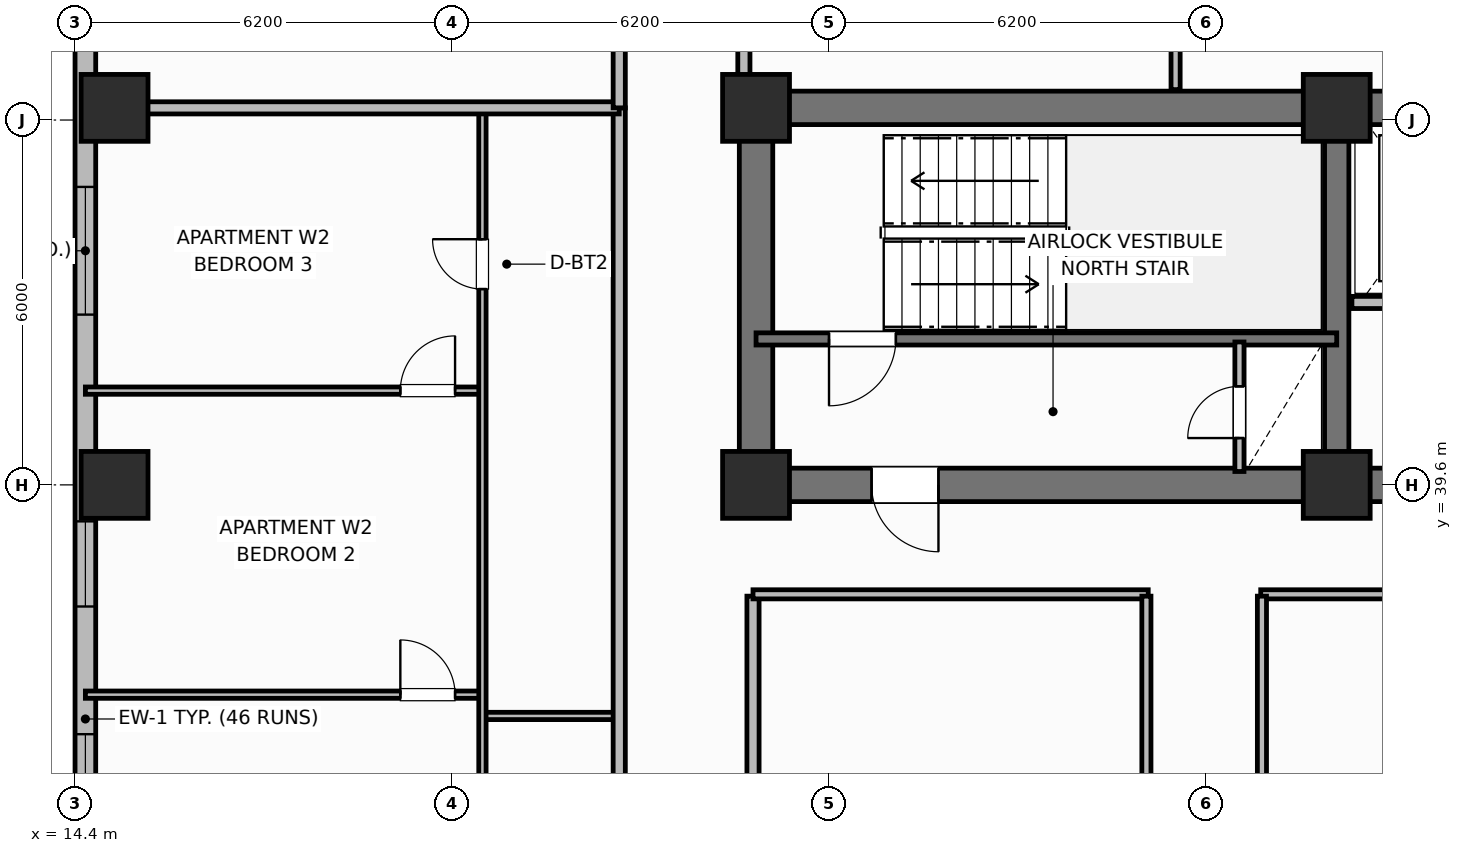
"""IFC4 building model, lengths in metres.
Left out: names, types, materials, properties, quantities, classifications, styles, units other than length and angle.
Written with IfcOpenShell. Run it as: python <this file> out.ifc"""

import sys

from ifc_helpers import new_model, si_unit, direction, frame, frame_2d, origin, origin_2d, place, context, subcontext, project, spatial, rectangle, extrude, element, fill, save


model = new_model("IFC4")
c1 = context("Model", 3, precision=1e-05, world=origin(), true_north=direction((0.0, 1.0)))
c2 = subcontext(c1, "Body", "Model", "MODEL_VIEW")
j1 = project(units=[si_unit("LENGTHUNIT", "METRE"), si_unit("PLANEANGLEUNIT", "RADIAN")], contexts=[c1])
p1 = place(None, origin())
s1 = spatial("IfcSite", under=j1, at=p1, CompositionType="ELEMENT")
p2 = place(p1, origin())
s2 = spatial("IfcBuilding", under=s1, at=p2, CompositionType="ELEMENT")
p3 = place(p2, frame((0.0, 0.0, 121.6)))
s3 = spatial("IfcBuildingStorey", under=s2, at=p3, CompositionType="ELEMENT", Elevation=121.6)
p4 = place(p3, frame((25.6, 45.8, 0.0), z_axis=(0.0, 0.0, 1.0), x_axis=(1.0, 0.0, 0.0)))
e1 = element("IfcWall", 1, at=p4, inside=s3, PredefinedType="SHEAR", context=c2, shape_type="SweptSolid", body=[
    extrude(rectangle(XDim=27.2, YDim=0.55, at=frame_2d((13.6, 0.0))), origin(), (0.0, 0.0, 1.0), 3.7),
])
p5 = place(p3, frame((25.6, 39.875, 0.0), z_axis=(0.0, 0.0, 1.0), x_axis=(0.0, 1.0, 0.0)))
e2 = element("IfcWall", 2, at=p5, inside=s3, PredefinedType="SHEAR", context=c2, shape_type="SweptSolid", body=[
    extrude(rectangle(XDim=5.65, YDim=0.55, at=frame_2d((2.825, 0.0))), origin(), (0.0, 0.0, 1.0), 3.7),
])
p6 = place(p3, frame((52.8, 39.6, 0.0), z_axis=(0.0, 0.0, 1.0), x_axis=(-1.0, 0.0, 0.0)))
e3 = element("IfcWall", 3, at=p6, inside=s3, PredefinedType="SHEAR", context=c2, shape_type="SweptSolid", body=[
    extrude(rectangle(XDim=27.2, YDim=0.55, at=frame_2d((13.6, 0.0))), origin(), (0.0, 0.0, 1.0), 3.7),
])
p7 = place(p6, frame((24.2, 0.0, 0.0)))
e4 = element("IfcOpeningElement", 4, at=p7, cuts=e3, PredefinedType="OPENING", context=c2, shape_type="SweptSolid", body=[
    extrude(rectangle(XDim=1.1, YDim=2.15, at=frame_2d((0.55, 1.075))), frame((0.0, 0.285, 0.0), z_axis=(0.0, -1.0, 0.0), x_axis=(1.0, 0.0, 0.0)), (0.0, 0.0, 1.0), 0.57),
])
p8 = place(p6, frame((15.1, 0.0, 0.0)))
e5 = element("IfcOpeningElement", 5, at=p8, cuts=e3, PredefinedType="OPENING", context=c2, shape_type="SweptSolid", body=[
    extrude(rectangle(XDim=1.2, YDim=2.15, at=frame_2d((0.6, 1.075))), frame((0.0, 0.285, 0.0), z_axis=(0.0, -1.0, 0.0), x_axis=(1.0, 0.0, 0.0)), (0.0, 0.0, 1.0), 0.57),
])
p9 = place(p6, frame((11.3, 0.0, 0.0)))
e6 = element("IfcOpeningElement", 6, at=p9, cuts=e3, PredefinedType="OPENING", context=c2, shape_type="SweptSolid", body=[
    extrude(rectangle(XDim=1.3, YDim=2.2, at=frame_2d((0.65, 1.1))), frame((0.0, 0.285, 0.0), z_axis=(0.0, -1.0, 0.0), x_axis=(1.0, 0.0, 0.0)), (0.0, 0.0, 1.0), 0.57),
])
p10 = place(p6, frame((7.25, 0.0, 0.0)))
e7 = element("IfcOpeningElement", 7, at=p10, cuts=e3, PredefinedType="OPENING", context=c2, shape_type="SweptSolid", body=[
    extrude(rectangle(XDim=0.85, YDim=2.1, at=frame_2d((0.425, 1.05))), frame((0.0, 0.285, 0.0), z_axis=(0.0, -1.0, 0.0), x_axis=(1.0, 0.0, 0.0)), (0.0, 0.0, 1.0), 0.57),
])
p11 = place(p6, frame((3.0, 0.0, 0.0)))
e8 = element("IfcOpeningElement", 8, at=p11, cuts=e3, PredefinedType="OPENING", context=c2, shape_type="SweptSolid", body=[
    extrude(rectangle(XDim=0.9, YDim=2.1, at=frame_2d((0.45, 1.05))), frame((0.0, 0.285, 0.0), z_axis=(0.0, -1.0, 0.0), x_axis=(1.0, 0.0, 0.0)), (0.0, 0.0, 1.0), 0.57),
])
p12 = place(p3, frame((35.15, 39.875, 0.0), z_axis=(0.0, 0.0, 1.0), x_axis=(0.0, 1.0, 0.0)))
e9 = element("IfcWall", 9, at=p12, inside=s3, PredefinedType="SHEAR", context=c2, shape_type="SweptSolid", body=[
    extrude(rectangle(XDim=5.65, YDim=0.4, at=frame_2d((2.825, 0.0))), origin(), (0.0, 0.0, 1.0), 3.7),
])
for number, where, z_axis, x_axis in (
    (10, (25.6, 39.6, 0.0), (0.0, 0.0, 1.0), (1.0, 0.0, 0.0)),
    (11, (25.6, 45.8, 0.0), (0.0, 0.0, 1.0), (1.0, 0.0, 0.0)),
    (12, (35.15, 39.6, 0.0), (0.0, 0.0, 1.0), (1.0, 0.0, 0.0)),
    (13, (35.15, 45.8, 0.0), (0.0, 0.0, 1.0), (1.0, 0.0, 0.0)),
    (14, (15.05, 39.6, 0.0), (0.0, 0.0, 1.0), (1.0, 0.0, 0.0)),
    (15, (15.05, 45.8, 0.0), (0.0, 0.0, 1.0), (1.0, 0.0, 0.0)),
):
    element("IfcColumn", number, at=place(p3, frame(where, z_axis=z_axis, x_axis=x_axis)), inside=s3, PredefinedType="COLUMN", context=c2, shape_type="SweptSolid", body=[
        extrude(rectangle(XDim=1.1, YDim=1.1, at=origin_2d()), origin(), (0.0, 0.0, 1.0), 3.7),
    ])
p13 = place(p3, frame((14.57, 47.4, 0.0), z_axis=(0.0, 0.0, 1.0), x_axis=(0.0, -1.0, 0.0)))
e16 = element("IfcWall", 16, at=p13, inside=s3, PredefinedType="SOLIDWALL", context=c2, shape_type="SweptSolid", body=[
    extrude(rectangle(XDim=14.8, YDim=0.34, at=frame_2d((7.4, 0.0))), origin(), (0.0, 0.0, 1.0), 2.7),
])
p14 = place(p13, frame((2.9, 0.0, 0.68)))
e17 = element("IfcOpeningElement", 17, at=p14, cuts=e16, PredefinedType="OPENING", context=c2, shape_type="SweptSolid", body=[
    extrude(rectangle(XDim=2.1, YDim=1.9, at=frame_2d((1.05, 0.95))), frame((0.0, 0.18, 0.0), z_axis=(0.0, -1.0, 0.0), x_axis=(1.0, 0.0, 0.0)), (0.0, 0.0, 1.0), 0.36),
])
p15 = place(p13, frame((8.4, 0.0, 0.69)))
e18 = element("IfcOpeningElement", 18, at=p15, cuts=e16, PredefinedType="OPENING", context=c2, shape_type="SweptSolid", body=[
    extrude(rectangle(XDim=1.4, YDim=1.85, at=frame_2d((0.7, 0.925))), frame((0.0, 0.18, 0.0), z_axis=(0.0, -1.0, 0.0), x_axis=(1.0, 0.0, 0.0)), (0.0, 0.0, 1.0), 0.36),
])
p16 = place(p13, frame((11.9, 0.0, 0.68)))
e19 = element("IfcOpeningElement", 19, at=p16, cuts=e16, PredefinedType="OPENING", context=c2, shape_type="SweptSolid", body=[
    extrude(rectangle(XDim=2.1, YDim=1.9, at=frame_2d((1.05, 0.95))), frame((0.0, 0.18, 0.0), z_axis=(0.0, -1.0, 0.0), x_axis=(1.0, 0.0, 0.0)), (0.0, 0.0, 1.0), 0.36),
])
p17 = place(p3, frame((35.15, 42.0, 0.0), z_axis=(0.0, 0.0, 1.0), x_axis=(-1.0, 0.0, 0.0)))
e20 = element("IfcWall", 20, at=p17, inside=s3, PredefinedType="SHEAR", context=c2, shape_type="SweptSolid", body=[
    extrude(rectangle(XDim=9.55, YDim=0.2, at=frame_2d((4.775, 0.0))), origin(), (0.0, 0.0, 1.0), 3.7),
])
p18 = place(p17, frame((7.25, 0.0, 0.0)))
e21 = element("IfcOpeningElement", 21, at=p18, cuts=e20, PredefinedType="OPENING", context=c2, shape_type="SweptSolid", body=[
    extrude(rectangle(XDim=1.1, YDim=2.15, at=frame_2d((0.55, 1.075))), frame((0.0, 0.11, 0.0), z_axis=(0.0, -1.0, 0.0), x_axis=(1.0, 0.0, 0.0)), (0.0, 0.0, 1.0), 0.22),
])
p19 = place(p3, frame((33.55, 39.82, 0.0), z_axis=(0.0, 0.0, 1.0), x_axis=(0.0, 1.0, 0.0)))
e22 = element("IfcWall", 22, at=p19, inside=s3, PredefinedType="PARTITIONING", context=c2, shape_type="SweptSolid", body=[
    extrude(rectangle(XDim=2.13, YDim=0.15, at=frame_2d((1.065, 0.0))), origin(), (0.0, 0.0, 1.0), 2.53),
])
p20 = place(p19, frame((0.55, 0.0, 0.0)))
e23 = element("IfcOpeningElement", 23, at=p20, cuts=e22, PredefinedType="OPENING", context=c2, shape_type="SweptSolid", body=[
    extrude(rectangle(XDim=0.85, YDim=2.05, at=frame_2d((0.425, 1.025))), frame((0.0, 0.085, 0.0), z_axis=(0.0, -1.0, 0.0), x_axis=(1.0, 0.0, 0.0)), (0.0, 0.0, 1.0), 0.17),
])
p21 = place(p3, frame((37.95, 42.6, 0.0), z_axis=(0.0, 0.0, 1.0), x_axis=(-1.0, 0.0, 0.0)))
e24 = element("IfcWall", 24, at=p21, inside=s3, PredefinedType="PARTITIONING", context=c2, shape_type="SweptSolid", body=[
    extrude(rectangle(XDim=2.55, YDim=0.2, at=frame_2d((1.275, 0.0))), origin(), (0.0, 0.0, 1.0), 2.3),
])
p22 = place(p21, frame((0.75, 0.0, 0.0)))
e25 = element("IfcOpeningElement", 25, at=p22, cuts=e24, PredefinedType="OPENING", context=c2, shape_type="SweptSolid", body=[
    extrude(rectangle(XDim=1.1, YDim=2.15, at=frame_2d((0.55, 1.075))), frame((0.0, 0.11, 0.0), z_axis=(0.0, -1.0, 0.0), x_axis=(1.0, 0.0, 0.0)), (0.0, 0.0, 1.0), 0.22),
])
p23 = place(p3, frame((25.55, 18.63, 0.0), z_axis=(0.0, 0.0, 1.0), x_axis=(0.0, 1.0, 0.0)))
e26 = element("IfcWall", 26, at=p23, inside=s3, PredefinedType="PARTITIONING", context=c2, shape_type="SweptSolid", body=[
    extrude(rectangle(XDim=19.14, YDim=0.2, at=frame_2d((9.57, 0.0))), origin(), (0.0, 0.0, 1.0), 2.53),
])
p24 = place(p3, frame((25.55, 37.8, 0.0), z_axis=(0.0, 0.0, 1.0), x_axis=(1.0, 0.0, 0.0)))
e27 = element("IfcWall", 27, at=p24, inside=s3, PredefinedType="PARTITIONING", context=c2, shape_type="SweptSolid", body=[
    extrude(rectangle(XDim=6.5, YDim=0.15, at=frame_2d((3.25, 0.0))), origin(), (0.0, 0.0, 1.0), 2.53),
])
p25 = place(p3, frame((33.9, 37.8, 0.0), z_axis=(0.0, 0.0, 1.0), x_axis=(1.0, 0.0, 0.0)))
e28 = element("IfcWall", 28, at=p25, inside=s3, PredefinedType="PARTITIONING", context=c2, shape_type="SweptSolid", body=[
    extrude(rectangle(XDim=10.6, YDim=0.15, at=frame_2d((5.3, 0.0))), origin(), (0.0, 0.0, 1.0), 2.53),
])
p26 = place(p3, frame((32.02, 18.63, 0.0), z_axis=(0.0, 0.0, 1.0), x_axis=(0.0, 1.0, 0.0)))
e29 = element("IfcWall", 29, at=p26, inside=s3, PredefinedType="PARTITIONING", context=c2, shape_type="SweptSolid", body=[
    extrude(rectangle(XDim=19.14, YDim=0.15, at=frame_2d((9.57, 0.0))), origin(), (0.0, 0.0, 1.0), 2.53),
])
p27 = place(p26, frame((5.0, 0.0, 0.0)))
e30 = element("IfcOpeningElement", 30, at=p27, cuts=e29, PredefinedType="OPENING", context=c2, shape_type="SweptSolid", body=[
    extrude(rectangle(XDim=0.9, YDim=2.1, at=frame_2d((0.45, 1.05))), frame((0.0, 0.085, 0.0), z_axis=(0.0, -1.0, 0.0), x_axis=(1.0, 0.0, 0.0)), (0.0, 0.0, 1.0), 0.17),
])
p28 = place(p3, frame((33.92, 18.63, 0.0), z_axis=(0.0, 0.0, 1.0), x_axis=(0.0, 1.0, 0.0)))
e31 = element("IfcWall", 31, at=p28, inside=s3, PredefinedType="PARTITIONING", context=c2, shape_type="SweptSolid", body=[
    extrude(rectangle(XDim=19.14, YDim=0.15, at=frame_2d((9.57, 0.0))), origin(), (0.0, 0.0, 1.0), 2.53),
])
p29 = place(p28, frame((6.5, 0.0, 0.0)))
e32 = element("IfcOpeningElement", 32, at=p29, cuts=e31, PredefinedType="OPENING", context=c2, shape_type="SweptSolid", body=[
    extrude(rectangle(XDim=1.0, YDim=2.15, at=frame_2d((0.5, 1.075))), frame((0.0, 0.085, 0.0), z_axis=(0.0, -1.0, 0.0), x_axis=(1.0, 0.0, 0.0)), (0.0, 0.0, 1.0), 0.17),
])
p30 = place(p3, frame((21.1, 35.8, 0.0), z_axis=(0.0, 0.0, 1.0), x_axis=(1.0, 0.0, 0.0)))
e33 = element("IfcWall", 33, at=p30, inside=s3, PredefinedType="PARTITIONING", context=c2, shape_type="SweptSolid", body=[
    extrude(rectangle(XDim=2.25, YDim=0.12, at=frame_2d((1.125, 0.0))), origin(), (0.0, 0.0, 1.0), 2.53),
])
p31 = place(p3, frame((14.57, 36.15, 0.0), z_axis=(0.0, 0.0, 1.0), x_axis=(1.0, 0.0, 0.0)))
e34 = element("IfcWall", 34, at=p31, inside=s3, PredefinedType="PARTITIONING", context=c2, shape_type="SweptSolid", body=[
    extrude(rectangle(XDim=6.53, YDim=0.12, at=frame_2d((3.265, 0.0))), origin(), (0.0, 0.0, 1.0), 2.53),
])
p32 = place(p31, frame((5.18, 0.0, 0.0)))
e35 = element("IfcOpeningElement", 35, at=p32, cuts=e34, PredefinedType="OPENING", context=c2, shape_type="SweptSolid", body=[
    extrude(rectangle(XDim=0.9, YDim=2.1, at=frame_2d((0.45, 1.05))), frame((0.0, 0.07, 0.0), z_axis=(0.0, -1.0, 0.0), x_axis=(1.0, 0.0, 0.0)), (0.0, 0.0, 1.0), 0.14),
])
p33 = place(p3, frame((14.57, 41.15, 0.0), z_axis=(0.0, 0.0, 1.0), x_axis=(1.0, 0.0, 0.0)))
e36 = element("IfcWall", 36, at=p33, inside=s3, PredefinedType="PARTITIONING", context=c2, shape_type="SweptSolid", body=[
    extrude(rectangle(XDim=6.53, YDim=0.12, at=frame_2d((3.265, 0.0))), origin(), (0.0, 0.0, 1.0), 2.53),
])
p34 = place(p33, frame((5.18, 0.0, 0.0)))
e37 = element("IfcOpeningElement", 37, at=p34, cuts=e36, PredefinedType="OPENING", context=c2, shape_type="SweptSolid", body=[
    extrude(rectangle(XDim=0.9, YDim=2.1, at=frame_2d((0.45, 1.05))), frame((0.0, 0.07, 0.0), z_axis=(0.0, -1.0, 0.0), x_axis=(1.0, 0.0, 0.0)), (0.0, 0.0, 1.0), 0.14),
])
p35 = place(p3, frame((21.1, 26.64, 0.0), z_axis=(0.0, 0.0, 1.0), x_axis=(0.0, 1.0, 0.0)))
e38 = element("IfcWall", 38, at=p35, inside=s3, PredefinedType="PARTITIONING", context=c2, shape_type="SweptSolid", body=[
    extrude(rectangle(XDim=19.12, YDim=0.12, at=frame_2d((9.56, 0.0))), origin(), (0.0, 0.0, 1.0), 2.53),
])
p36 = place(p35, frame((2.81, 0.0, 0.0)))
e39 = element("IfcOpeningElement", 39, at=p36, cuts=e38, PredefinedType="OPENING", context=c2, shape_type="SweptSolid", body=[
    extrude(rectangle(XDim=0.9, YDim=2.1, at=frame_2d((0.45, 1.05))), frame((0.0, 0.07, 0.0), z_axis=(0.0, -1.0, 0.0), x_axis=(1.0, 0.0, 0.0)), (0.0, 0.0, 1.0), 0.14),
])
p37 = place(p35, frame((16.18, 0.0, 0.0)))
e40 = element("IfcOpeningElement", 40, at=p37, cuts=e38, PredefinedType="OPENING", context=c2, shape_type="SweptSolid", body=[
    extrude(rectangle(XDim=0.82, YDim=2.08, at=frame_2d((0.41, 1.04))), frame((0.0, 0.07, 0.0), z_axis=(0.0, -1.0, 0.0), x_axis=(1.0, 0.0, 0.0)), (0.0, 0.0, 1.0), 0.14),
])
p38 = place(p3, frame((23.35, 10.6, 0.0), z_axis=(0.0, 0.0, 1.0), x_axis=(0.0, 1.0, 0.0)))
e41 = element("IfcWall", 41, at=p38, inside=s3, PredefinedType="PARTITIONING", context=c2, shape_type="SweptSolid", body=[
    extrude(rectangle(XDim=35.2, YDim=0.2, at=frame_2d((17.6, 0.0))), origin(), (0.0, 0.0, 1.0), 2.53),
])
p39 = place(p38, frame((2.65, 0.0, 0.0)))
e42 = element("IfcOpeningElement", 42, at=p39, cuts=e41, PredefinedType="OPENING", context=c2, shape_type="SweptSolid", body=[
    extrude(rectangle(XDim=1.0, YDim=2.15, at=frame_2d((0.5, 1.075))), frame((0.0, 0.11, 0.0), z_axis=(0.0, -1.0, 0.0), x_axis=(1.0, 0.0, 0.0)), (0.0, 0.0, 1.0), 0.22),
])
p40 = place(p38, frame((19.95, 0.0, 0.0)))
e43 = element("IfcOpeningElement", 43, at=p40, cuts=e41, PredefinedType="OPENING", context=c2, shape_type="SweptSolid", body=[
    extrude(rectangle(XDim=1.0, YDim=2.15, at=frame_2d((0.5, 1.075))), frame((0.0, 0.11, 0.0), z_axis=(0.0, -1.0, 0.0), x_axis=(1.0, 0.0, 0.0)), (0.0, 0.0, 1.0), 0.22),
])
p41 = place(p3, frame((14.99, 45.8, 0.0), z_axis=(0.0, 0.0, 1.0), x_axis=(1.0, 0.0, 0.0)))
e44 = element("IfcWall", 44, at=p41, inside=s3, PredefinedType="PARTITIONING", context=c2, shape_type="SweptSolid", body=[
    extrude(rectangle(XDim=8.36, YDim=0.2, at=frame_2d((4.18, 0.0))), origin(), (0.0, 0.0, 1.0), 2.53),
])
p42 = place(p3, frame((23.35, 45.8, 0.0), z_axis=(0.0, 0.0, 1.0), x_axis=(0.0, 1.0, 0.0)))
e45 = element("IfcWall", 45, at=p42, inside=s3, PredefinedType="PARTITIONING", context=c2, shape_type="SweptSolid", body=[
    extrude(rectangle(XDim=5.63, YDim=0.2, at=frame_2d((2.815, 0.0))), origin(), (0.0, 0.0, 1.0), 2.53),
])
p43 = place(p3, frame((32.5, 46.1, 0.0), z_axis=(0.0, 0.0, 1.0), x_axis=(0.0, 1.0, 0.0)))
e46 = element("IfcWall", 46, at=p43, inside=s3, PredefinedType="PARTITIONING", context=c2, shape_type="SweptSolid", body=[
    extrude(rectangle(XDim=5.33, YDim=0.15, at=frame_2d((2.665, 0.0))), origin(), (0.0, 0.0, 1.0), 2.53),
])
p44 = place(p43, frame((0.85, 0.0, 0.0)))
e47 = element("IfcOpeningElement", 47, at=p44, cuts=e46, PredefinedType="OPENING", context=c2, shape_type="SweptSolid", body=[
    extrude(rectangle(XDim=0.9, YDim=2.1, at=frame_2d((0.45, 1.05))), frame((0.0, 0.085, 0.0), z_axis=(0.0, -1.0, 0.0), x_axis=(1.0, 0.0, 0.0)), (0.0, 0.0, 1.0), 0.17),
])
p45 = place(p3, frame((25.4, 46.1, 0.0), z_axis=(0.0, 0.0, 1.0), x_axis=(0.0, 1.0, 0.0)))
e48 = element("IfcWall", 48, at=p45, inside=s3, PredefinedType="PARTITIONING", context=c2, shape_type="SweptSolid", body=[
    extrude(rectangle(XDim=4.53, YDim=0.2, at=frame_2d((2.265, 0.0))), origin(), (0.0, 0.0, 1.0), 2.53),
])
p46 = place(p45, frame((1.05, 0.0, 0.0)))
e49 = element("IfcOpeningElement", 49, at=p46, cuts=e48, PredefinedType="OPENING", context=c2, shape_type="SweptSolid", body=[
    extrude(rectangle(XDim=0.9, YDim=2.1, at=frame_2d((0.45, 1.05))), frame((0.0, 0.11, 0.0), z_axis=(0.0, -1.0, 0.0), x_axis=(1.0, 0.0, 0.0)), (0.0, 0.0, 1.0), 0.22),
])
p47 = place(p14, origin())
e50 = element("IfcWindow", 50, at=p47, inside=s3, PartitioningType="SINGLE_PANEL", PredefinedType="WINDOW", context=c2, shape_type="SweptSolid", body=[
    extrude(rectangle(XDim=2.1, YDim=1.9, at=frame_2d((1.05, 0.95))), frame((0.0, 0.03, 0.0), z_axis=(0.0, -1.0, 0.0), x_axis=(1.0, 0.0, 0.0)), (0.0, 0.0, 1.0), 0.06),
])
fill(e17, e50)
p48 = place(p15, origin())
e51 = element("IfcWindow", 51, at=p48, inside=s3, PartitioningType="SINGLE_PANEL", PredefinedType="WINDOW", context=c2, shape_type="SweptSolid", body=[
    extrude(rectangle(XDim=1.4, YDim=1.85, at=frame_2d((0.7, 0.925))), frame((0.0, 0.03, 0.0), z_axis=(0.0, -1.0, 0.0), x_axis=(1.0, 0.0, 0.0)), (0.0, 0.0, 1.0), 0.06),
])
fill(e18, e51)
p49 = place(p16, origin())
e52 = element("IfcWindow", 52, at=p49, inside=s3, PartitioningType="SINGLE_PANEL", PredefinedType="WINDOW", context=c2, shape_type="SweptSolid", body=[
    extrude(rectangle(XDim=2.1, YDim=1.9, at=frame_2d((1.05, 0.95))), frame((0.0, 0.03, 0.0), z_axis=(0.0, -1.0, 0.0), x_axis=(1.0, 0.0, 0.0)), (0.0, 0.0, 1.0), 0.06),
])
fill(e19, e52)
p50 = place(p18, origin())
e53 = element("IfcDoor", 53, at=p50, inside=s3, OperationType="SINGLE_SWING_RIGHT", PredefinedType="DOOR", context=c2, shape_type="SweptSolid", body=[
    extrude(rectangle(XDim=1.1, YDim=2.15, at=frame_2d((0.55, 1.075))), frame((0.0, 0.025, 0.0), z_axis=(0.0, -1.0, 0.0), x_axis=(1.0, 0.0, 0.0)), (0.0, 0.0, 1.0), 0.05),
])
fill(e21, e53)
p51 = place(p20, origin())
e54 = element("IfcDoor", 54, at=p51, inside=s3, OperationType="SINGLE_SWING_LEFT", PredefinedType="TRAPDOOR", context=c2, shape_type="SweptSolid", body=[
    extrude(rectangle(XDim=0.85, YDim=2.05, at=frame_2d((0.425, 1.025))), frame((0.0, 0.025, 0.0), z_axis=(0.0, -1.0, 0.0), x_axis=(1.0, 0.0, 0.0)), (0.0, 0.0, 1.0), 0.05),
])
fill(e23, e54)
p52 = place(p32, origin())
e55 = element("IfcDoor", 55, at=p52, inside=s3, OperationType="SINGLE_SWING_LEFT", PredefinedType="DOOR", context=c2, shape_type="SweptSolid", body=[
    extrude(rectangle(XDim=0.9, YDim=2.1, at=frame_2d((0.45, 1.05))), frame((0.0, 0.025, 0.0), z_axis=(0.0, -1.0, 0.0), x_axis=(1.0, 0.0, 0.0)), (0.0, 0.0, 1.0), 0.05),
])
fill(e35, e55)
p53 = place(p34, origin())
e56 = element("IfcDoor", 56, at=p53, inside=s3, OperationType="SINGLE_SWING_RIGHT", PredefinedType="DOOR", context=c2, shape_type="SweptSolid", body=[
    extrude(rectangle(XDim=0.9, YDim=2.1, at=frame_2d((0.45, 1.05))), frame((0.0, 0.025, 0.0), z_axis=(0.0, -1.0, 0.0), x_axis=(1.0, 0.0, 0.0)), (0.0, 0.0, 1.0), 0.05),
])
fill(e37, e56)
p54 = place(p37, origin())
e57 = element("IfcDoor", 57, at=p54, inside=s3, OperationType="SINGLE_SWING_RIGHT", PredefinedType="DOOR", context=c2, shape_type="SweptSolid", body=[
    extrude(rectangle(XDim=0.82, YDim=2.08, at=frame_2d((0.41, 1.04))), frame((0.0, 0.025, 0.0), z_axis=(0.0, -1.0, 0.0), x_axis=(1.0, 0.0, 0.0)), (0.0, 0.0, 1.0), 0.05),
])
fill(e40, e57)
p55 = place(p7, origin())
e58 = element("IfcDoor", 58, at=p55, inside=s3, OperationType="SINGLE_SWING_LEFT", PredefinedType="DOOR", context=c2, shape_type="SweptSolid", body=[
    extrude(rectangle(XDim=1.1, YDim=2.15, at=frame_2d((0.55, 1.075))), frame((0.0, 0.025, 0.0), z_axis=(0.0, -1.0, 0.0), x_axis=(1.0, 0.0, 0.0)), (0.0, 0.0, 1.0), 0.05),
])
fill(e4, e58)
save(model, sys.argv[1])
